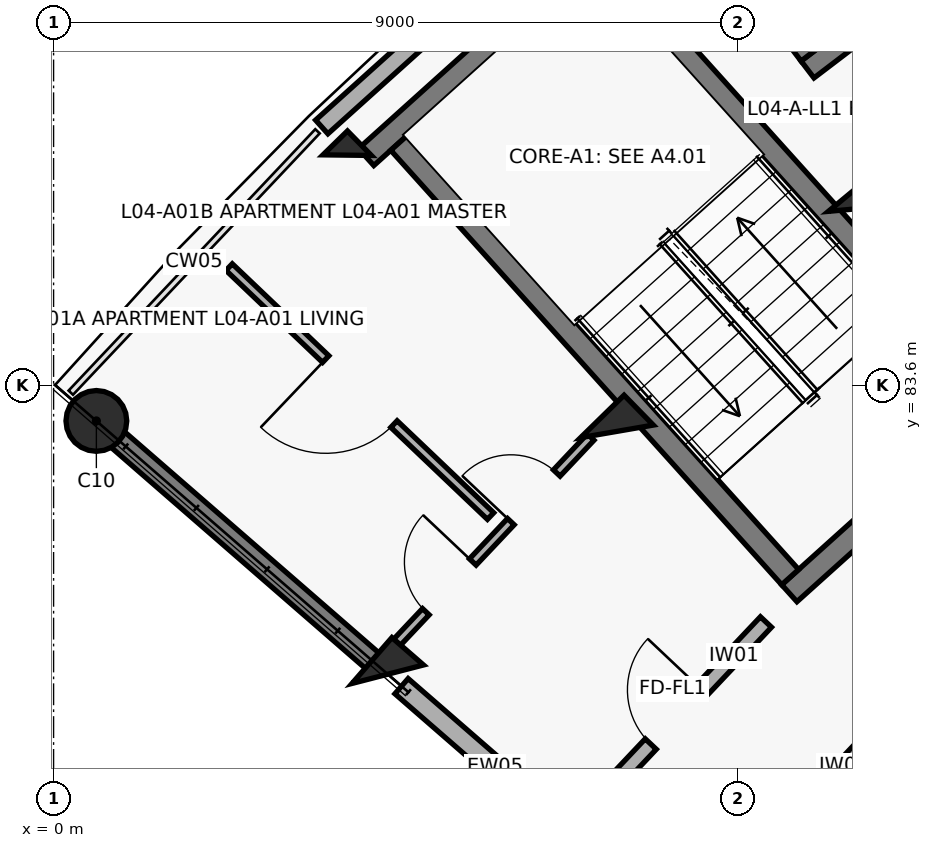
"""IFC4 building model, lengths in metres.
Left out: names, types, materials, properties, quantities, classifications, styles, units other than length and angle.
Written with IfcOpenShell. Run it as: python <this file> out.ifc"""

import sys

from ifc_helpers import new_model, si_unit, direction, frame, frame_2d, origin, origin_2d, place, context, subcontext, project, spatial, rectangle, circle, extrude, element, fill, save


model = new_model("IFC4")
c1 = context("Model", 3, precision=1e-05, world=origin(), true_north=direction((0.0, 1.0)))
c2 = subcontext(c1, "Body", "Model", "MODEL_VIEW")
j1 = project(units=[si_unit("LENGTHUNIT", "METRE"), si_unit("PLANEANGLEUNIT", "RADIAN")], contexts=[c1])
p1 = place(None, origin())
s1 = spatial("IfcSite", under=j1, at=p1, CompositionType="ELEMENT")
p2 = place(p1, origin())
s2 = spatial("IfcBuilding", under=s1, at=p2, CompositionType="ELEMENT")
p3 = place(p2, frame((0.0, 0.0, 14.3)))
s3 = spatial("IfcBuildingStorey", under=s2, at=p3, CompositionType="ELEMENT", Elevation=14.3)
p4 = place(p3, frame((4.397, 79.796, 0.0), z_axis=(0.0, 0.0, 1.0), x_axis=(-0.754709580223, 0.656059028991, 0.0)))
e1 = element("IfcColumn", 1, at=p4, inside=s3, PredefinedType="COLUMN", context=c2, shape_type="SweptSolid", body=[
    extrude(rectangle(XDim=0.55, YDim=0.8, at=origin_2d()), origin(), (0.0, 0.0, 1.0), 3.1),
])
p5 = place(p3, frame((0.563, 83.129, 0.0), z_axis=(0.0, 0.0, 1.0), x_axis=(-0.754709580223, 0.656059028991, 0.0)))
e2 = element("IfcColumn", 2, at=p5, inside=s3, PredefinedType="COLUMN", context=c2, shape_type="SweptSolid", body=[
    extrude(circle(Radius=0.4, at=origin_2d()), origin(), (0.0, 0.0, 1.0), 3.1),
])
p6 = place(p3, frame((7.412, 82.991, 0.0), z_axis=(0.0, 0.0, 1.0), x_axis=(-0.698665066769, 0.715448897181, 0.0)))
e3 = element("IfcColumn", 3, at=p6, inside=s3, PredefinedType="COLUMN", context=c2, shape_type="SweptSolid", body=[
    extrude(rectangle(XDim=0.55, YDim=0.8, at=origin_2d()), origin(), (0.0, 0.0, 1.0), 3.1),
])
p7 = place(p3, frame((3.863, 86.626, 0.0), z_axis=(0.0, 0.0, 1.0), x_axis=(-0.698665066769, 0.715448897181, 0.0)))
e4 = element("IfcColumn", 4, at=p7, inside=s3, PredefinedType="COLUMN", context=c2, shape_type="SweptSolid", body=[
    extrude(rectangle(XDim=0.45, YDim=0.45, at=origin_2d()), origin(), (0.0, 0.0, 1.0), 3.1),
])
p8 = place(p3, frame((10.678, 85.93, 0.0), z_axis=(0.0, 0.0, 1.0), x_axis=(-0.637961754089, 0.770068049148, 0.0)))
e5 = element("IfcColumn", 5, at=p8, inside=s3, PredefinedType="COLUMN", context=c2, shape_type="SweptSolid", body=[
    extrude(rectangle(XDim=0.55, YDim=0.8, at=origin_2d()), origin(), (0.0, 0.0, 1.0), 3.1),
])
p9 = place(p3, frame((4.261, 79.914, 0.0), z_axis=(0.0, 0.0, 1.0), x_axis=(-0.754703505217, 0.65606601742, 0.0)))
e6 = element("IfcWall", 6, at=p9, inside=s3, PredefinedType="SHEAR", context=c2, shape_type="SweptSolid", body=[
    extrude(rectangle(XDim=4.72, YDim=0.27, at=frame_2d((2.36, 0.0))), origin(), (0.0, 0.0, 1.0), 2.86),
])
p10 = place(p3, frame((3.528, 86.997, 0.0), z_axis=(0.0, 0.0, 1.0), x_axis=(0.743387539862, 0.668860946369, 0.0)))
e7 = element("IfcWall", 7, at=p10, inside=s3, PredefinedType="SOLIDWALL", context=c2, shape_type="SweptSolid", body=[
    extrude(rectangle(XDim=4.809, YDim=0.242, at=frame_2d((2.405, 0.0))), origin(), (0.0, 0.0, 1.0), 2.25),
])
p11 = place(p3, frame((10.766, 74.259, 0.0), z_axis=(0.0, 0.0, 1.0), x_axis=(-0.754717680958, 0.656049710044, 0.0)))
e8 = element("IfcWall", 8, at=p11, inside=s3, PredefinedType="SOLIDWALL", context=c2, shape_type="SweptSolid", body=[
    extrude(rectangle(XDim=8.2, YDim=0.265, at=frame_2d((4.1, 0.0))), origin(), (0.0, 0.0, 1.0), 2.08),
])
p12 = place(p11, frame((3.59, 0.0, 0.75)))
e9 = element("IfcOpeningElement", 9, at=p12, cuts=e8, PredefinedType="OPENING", context=c2, shape_type="SweptSolid", body=[
    extrude(rectangle(XDim=1.35, YDim=1.35, at=frame_2d((0.675, 0.675))), frame((0.0, 0.142, 0.0), z_axis=(0.0, -1.0, 0.0), x_axis=(1.0, 0.0, 0.0)), (0.0, 0.0, 1.0), 0.285),
])
p13 = place(p3, frame((12.557, 83.45, 0.0), z_axis=(0.0, 0.0, 1.0), x_axis=(-0.743375696158, -0.668874109501, 0.0)))
e10 = element("IfcWall", 10, at=p13, inside=s3, PredefinedType="SHEAR", context=c2, shape_type="SweptSolid", body=[
    extrude(rectangle(XDim=3.87, YDim=0.3, at=frame_2d((1.935, 0.0))), origin(), (0.0, 0.0, 1.0), 3.1),
])
p14 = place(p13, frame((1.41, 0.0, 0.0)))
e11 = element("IfcOpeningElement", 11, at=p14, cuts=e10, PredefinedType="OPENING", context=c2, shape_type="SweptSolid", body=[
    extrude(rectangle(XDim=1.05, YDim=2.15, at=frame_2d((0.525, 1.075))), frame((0.0, 0.16, 0.0), z_axis=(0.0, -1.0, 0.0), x_axis=(1.0, 0.0, 0.0)), (0.0, 0.0, 1.0), 0.32),
])
p15 = place(p3, frame((7.436, 89.59, 0.0), z_axis=(0.0, 0.0, 1.0), x_axis=(-0.743400052815, -0.668847038922, 0.0)))
e12 = element("IfcWall", 12, at=p15, inside=s3, PredefinedType="SHEAR", context=c2, shape_type="SweptSolid", body=[
    extrude(rectangle(XDim=4.47, YDim=0.3, at=frame_2d((2.235, 0.0))), origin(), (0.0, 0.0, 1.0), 3.1),
])
p16 = place(p3, frame((12.345, 83.461, 0.0), z_axis=(0.0, 0.0, 1.0), x_axis=(-0.668868253964, 0.743380964808, 0.0)))
e13 = element("IfcWall", 13, at=p16, inside=s3, PredefinedType="SHEAR", context=c2, shape_type="SweptSolid", body=[
    extrude(rectangle(XDim=7.69, YDim=0.3, at=frame_2d((3.845, 0.0))), origin(), (0.0, 0.0, 1.0), 3.1),
])
p17 = place(p3, frame((9.691, 81.073, 0.0), z_axis=(0.0, 0.0, 1.0), x_axis=(-0.668885797871, 0.743365179038, 0.0)))
e14 = element("IfcWall", 14, at=p17, inside=s3, PredefinedType="SHEAR", context=c2, shape_type="SweptSolid", body=[
    extrude(rectangle(XDim=7.69, YDim=0.3, at=frame_2d((3.845, 0.0))), origin(), (0.0, 0.0, 1.0), 3.1),
])
p18 = place(p3, frame((12.616, 89.807, 0.0), z_axis=(0.0, 0.0, 1.0), x_axis=(-0.795474703455, -0.605986795371, 0.0)))
e15 = element("IfcWall", 15, at=p18, inside=s3, PredefinedType="SHEAR", context=c2, shape_type="SweptSolid", body=[
    extrude(rectangle(XDim=3.39, YDim=0.28, at=frame_2d((1.695, 0.0))), origin(), (0.0, 0.0, 1.0), 3.1),
])
p19 = place(p18, frame((1.095, 0.0, 0.0)))
e16 = element("IfcOpeningElement", 16, at=p19, cuts=e15, PredefinedType="OPENING", context=c2, shape_type="SweptSolid", body=[
    extrude(rectangle(XDim=1.2, YDim=2.15, at=frame_2d((0.6, 1.075))), frame((0.0, 0.15, 0.0), z_axis=(0.0, -1.0, 0.0), x_axis=(1.0, 0.0, 0.0)), (0.0, 0.0, 1.0), 0.3),
])
p20 = place(p3, frame((9.946, 87.949, 0.0), z_axis=(0.0, 0.0, 1.0), x_axis=(-0.605891019062, 0.795547656033, 0.0)))
e17 = element("IfcWall", 17, at=p20, inside=s3, PredefinedType="SHEAR", context=c2, shape_type="SweptSolid", body=[
    extrude(rectangle(XDim=2.03, YDim=0.28, at=frame_2d((1.015, 0.0))), origin(), (0.0, 0.0, 1.0), 3.1),
])
p21 = place(p3, frame((7.014, 77.984, 0.0), z_axis=(0.0, 0.0, 1.0), x_axis=(0.686310507227, 0.727308660522, 0.0)))
e18 = element("IfcWall", 18, at=p21, inside=s3, PredefinedType="SOLIDWALL", context=c2, shape_type="SweptSolid", body=[
    extrude(rectangle(XDim=3.436, YDim=0.2, at=frame_2d((1.718, 0.0))), origin(), (0.0, 0.0, 1.0), 2.08),
])
p22 = place(p21, frame((1.228, 0.0, 0.0)))
e19 = element("IfcOpeningElement", 19, at=p22, cuts=e18, PredefinedType="OPENING", context=c2, shape_type="SweptSolid", body=[
    extrude(rectangle(XDim=0.98, YDim=2.15, at=frame_2d((0.49, 1.075))), frame((0.0, 0.11, 0.0), z_axis=(0.0, -1.0, 0.0), x_axis=(1.0, 0.0, 0.0)), (0.0, 0.0, 1.0), 0.22),
])
p23 = place(p3, frame((8.561, 76.639, 0.0), z_axis=(0.0, 0.0, 1.0), x_axis=(0.686307658735, 0.727311348434, 0.0)))
e20 = element("IfcWall", 20, at=p23, inside=s3, PredefinedType="SOLIDWALL", context=c2, shape_type="SweptSolid", body=[
    extrude(rectangle(XDim=3.269, YDim=0.19, at=frame_2d((1.634, 0.0))), origin(), (0.0, 0.0, 1.0), 2.08),
])
p24 = place(p23, frame((1.184, 0.0, 0.0)))
e21 = element("IfcOpeningElement", 21, at=p24, cuts=e20, PredefinedType="OPENING", context=c2, shape_type="SweptSolid", body=[
    extrude(rectangle(XDim=0.9, YDim=2.1, at=frame_2d((0.45, 1.05))), frame((0.0, 0.105, 0.0), z_axis=(0.0, -1.0, 0.0), x_axis=(1.0, 0.0, 0.0)), (0.0, 0.0, 1.0), 0.21),
])
p25 = place(p3, frame((4.452, 80.145, 0.0), z_axis=(0.0, 0.0, 1.0), x_axis=(0.686301674417, 0.727316995327, 0.0)))
e22 = element("IfcWall", 22, at=p25, inside=s3, PredefinedType="PARTITIONING", context=c2, shape_type="SweptSolid", body=[
    extrude(rectangle(XDim=3.81, YDim=0.12, at=frame_2d((1.905, 0.0))), origin(), (0.0, 0.0, 1.0), 2.08),
])
p26 = place(p25, frame((0.65, 0.0, 0.0)))
e23 = element("IfcOpeningElement", 23, at=p26, cuts=e22, PredefinedType="OPENING", context=c2, shape_type="SweptSolid", body=[
    extrude(rectangle(XDim=0.9, YDim=2.1, at=frame_2d((0.45, 1.05))), frame((0.0, 0.07, 0.0), z_axis=(0.0, -1.0, 0.0), x_axis=(1.0, 0.0, 0.0)), (0.0, 0.0, 1.0), 0.14),
])
p27 = place(p25, frame((2.28, 0.0, 0.0)))
e24 = element("IfcOpeningElement", 24, at=p27, cuts=e22, PredefinedType="OPENING", context=c2, shape_type="SweptSolid", body=[
    extrude(rectangle(XDim=0.88, YDim=2.1, at=frame_2d((0.44, 1.05))), frame((0.0, 0.07, 0.0), z_axis=(0.0, -1.0, 0.0), x_axis=(1.0, 0.0, 0.0)), (0.0, 0.0, 1.0), 0.14),
])
p28 = place(p3, frame((5.749, 81.877, 0.0), z_axis=(0.0, 0.0, 1.0), x_axis=(-0.724140375623, 0.689652605587, 0.0)))
e25 = element("IfcWall", 25, at=p28, inside=s3, PredefinedType="PARTITIONING", context=c2, shape_type="SweptSolid", body=[
    extrude(rectangle(XDim=4.75, YDim=0.12, at=frame_2d((2.375, 0.0))), origin(), (0.0, 0.0, 1.0), 2.08),
])
p29 = place(p28, frame((1.755, 0.0, 0.0)))
e26 = element("IfcOpeningElement", 26, at=p29, cuts=e25, PredefinedType="OPENING", context=c2, shape_type="SweptSolid", body=[
    extrude(rectangle(XDim=1.24, YDim=2.1, at=frame_2d((0.62, 1.05))), frame((0.0, 0.07, 0.0), z_axis=(0.0, -1.0, 0.0), x_axis=(1.0, 0.0, 0.0)), (0.0, 0.0, 1.0), 0.14),
])
p30 = place(p22, origin())
e27 = element("IfcDoor", 27, at=p30, inside=s3, OperationType="SINGLE_SWING_RIGHT", PredefinedType="DOOR", context=c2, shape_type="SweptSolid", body=[
    extrude(rectangle(XDim=0.98, YDim=2.15, at=frame_2d((0.49, 1.075))), frame((0.0, 0.025, 0.0), z_axis=(0.0, -1.0, 0.0), x_axis=(1.0, 0.0, 0.0)), (0.0, 0.0, 1.0), 0.05),
])
fill(e19, e27)
p31 = place(p26, origin())
e28 = element("IfcDoor", 28, at=p31, inside=s3, OperationType="SINGLE_SWING_RIGHT", PredefinedType="DOOR", context=c2, shape_type="SweptSolid", body=[
    extrude(rectangle(XDim=0.9, YDim=2.1, at=frame_2d((0.45, 1.05))), frame((0.0, 0.025, 0.0), z_axis=(0.0, -1.0, 0.0), x_axis=(1.0, 0.0, 0.0)), (0.0, 0.0, 1.0), 0.05),
])
fill(e23, e28)
p32 = place(p27, origin())
e29 = element("IfcDoor", 29, at=p32, inside=s3, OperationType="SINGLE_SWING_LEFT", PredefinedType="DOOR", context=c2, shape_type="SweptSolid", body=[
    extrude(rectangle(XDim=0.88, YDim=2.1, at=frame_2d((0.44, 1.05))), frame((0.0, 0.025, 0.0), z_axis=(0.0, -1.0, 0.0), x_axis=(1.0, 0.0, 0.0)), (0.0, 0.0, 1.0), 0.05),
])
fill(e24, e29)
p33 = place(p29, origin())
e30 = element("IfcDoor", 30, at=p33, inside=s3, OperationType="SINGLE_SWING_RIGHT", PredefinedType="DOOR", context=c2, shape_type="SweptSolid", body=[
    extrude(rectangle(XDim=1.24, YDim=2.1, at=frame_2d((0.62, 1.05))), frame((0.0, 0.025, 0.0), z_axis=(0.0, -1.0, 0.0), x_axis=(1.0, 0.0, 0.0)), (0.0, 0.0, 1.0), 0.05),
])
fill(e26, e30)
save(model, sys.argv[1])
